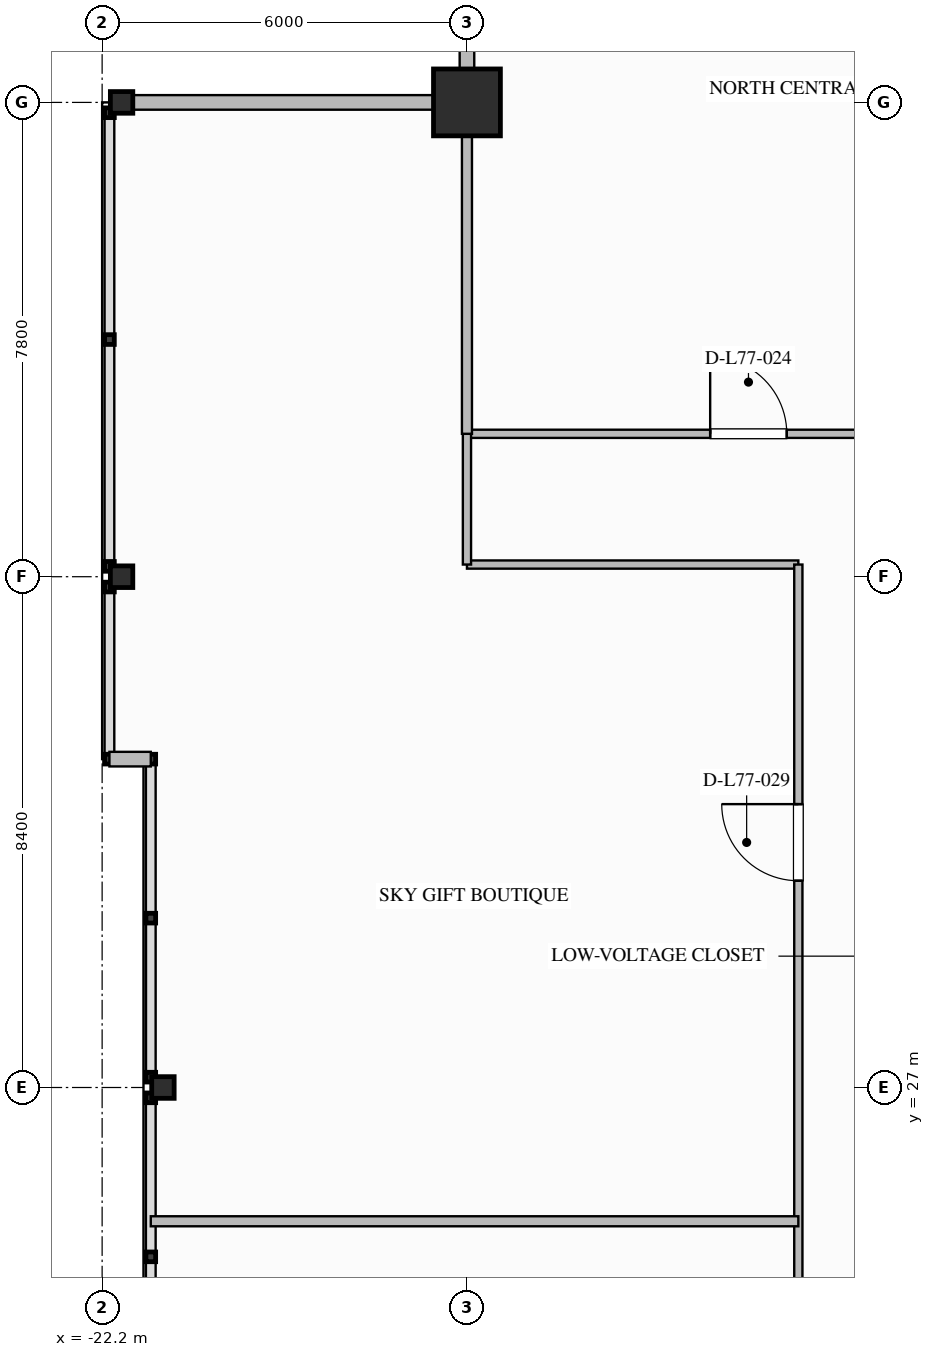
"""IFC4 building model, lengths in metres.
Left out: names, types, materials, properties, quantities, classifications, styles, units other than length and angle.
Written with IfcOpenShell. Run it as: python <this file> out.ifc"""

import sys

from ifc_helpers import new_model, si_unit, direction, frame, frame_2d, origin, origin_2d, place, context, subcontext, project, spatial, rectangle, i_section, extrude, element, fill, save


model = new_model("IFC4")
c1 = context("Model", 3, precision=1e-05, world=origin(), true_north=direction((0.0, 1.0)))
c2 = subcontext(c1, "Body", "Model", "MODEL_VIEW")
j1 = project(units=[si_unit("LENGTHUNIT", "METRE"), si_unit("PLANEANGLEUNIT", "RADIAN")], contexts=[c1])
p1 = place(None, origin())
s1 = spatial("IfcSite", under=j1, at=p1, CompositionType="ELEMENT")
p2 = place(p1, origin())
s2 = spatial("IfcBuilding", under=s1, at=p2, CompositionType="ELEMENT")
p3 = place(p2, frame((0.0, 0.0, 294.2)))
s3 = spatial("IfcBuildingStorey", under=s2, at=p3, CompositionType="ELEMENT", Elevation=294.2)
p4 = place(p3, frame((-16.2, 43.2, 0.0), z_axis=(0.0, 0.0, 1.0), x_axis=(1.0, 0.0, 0.0)))
e1 = element("IfcColumn", 1, at=p4, inside=s3, PredefinedType="COLUMN", context=c2, shape_type="SweptSolid", body=[
    extrude(rectangle(XDim=1.1, YDim=1.1, at=origin_2d()), origin(), (0.0, 0.0, 1.0), 4.4),
])
for number, where, z_axis, x_axis in (
    (2, (-21.2, 27.0, 0.0), (0.0, 0.0, 1.0), (1.0, 0.0, 0.0)),
    (3, (-21.88, 35.4, 0.0), (0.0, 0.0, 1.0), (1.0, 0.0, 0.0)),
    (4, (-21.88, 43.2, 0.0), (0.0, 0.0, 1.0), (1.0, 0.0, 0.0)),
):
    element("IfcColumn", number, at=place(p3, frame(where, z_axis=z_axis, x_axis=x_axis)), inside=s3, PredefinedType="COLUMN", context=c2, shape_type="SweptSolid", body=[
        extrude(i_section(OverallWidth=0.369, OverallDepth=0.356, WebThickness=0.011, FlangeThickness=0.018, FilletRadius=0.025, at=origin_2d()), origin(), (0.0, 0.0, 1.0), 4.397),
    ])
for number, where, z_axis, x_axis in (
    (5, (-22.08, 43.2, 0.0), (0.0, 0.0, 1.0), (1.0, 0.0, 0.0)),
    (6, (-16.2, 43.2, 0.0), (0.0, 0.0, 1.0), (0.0, 1.0, 0.0)),
):
    element("IfcWall", number, at=place(p3, frame(where, z_axis=z_axis, x_axis=x_axis)), inside=s3, PredefinedType="STANDARD", context=c2, shape_type="SweptSolid", body=[
        extrude(rectangle(XDim=5.88, YDim=0.24, at=frame_2d((2.94, 0.0))), origin(), (0.0, 0.0, 1.0), 3.489),
    ])
p5 = place(p3, frame((-21.4, 32.4, 0.0), z_axis=(0.0, 0.0, 1.0), x_axis=(-1.0, 0.0, 0.0)))
e7 = element("IfcWall", 7, at=p5, inside=s3, PredefinedType="STANDARD", context=c2, shape_type="SweptSolid", body=[
    extrude(rectangle(XDim=0.68, YDim=0.24, at=frame_2d((0.34, 0.0))), origin(), (0.0, 0.0, 1.0), 4.1),
])
p6 = place(p3, frame((-16.2, 37.75, 0.0), z_axis=(0.0, 0.0, 1.0), x_axis=(1.0, 0.0, 0.0)))
e8 = element("IfcWall", 8, at=p6, inside=s3, PredefinedType="PARTITIONING", context=c2, shape_type="SweptSolid", body=[
    extrude(rectangle(XDim=32.4, YDim=0.135, at=frame_2d((16.2, 0.0))), origin(), (0.0, 0.0, 1.0), 4.1),
])
p7 = place(p6, frame((4.0, 0.0, 0.0)))
e9 = element("IfcOpeningElement", 9, at=p7, cuts=e8, PredefinedType="OPENING", context=c2, shape_type="SweptSolid", body=[
    extrude(rectangle(XDim=1.26, YDim=2.2, at=frame_2d((0.63, 1.1))), frame((0.0, 0.077, 0.0), z_axis=(0.0, -1.0, 0.0), x_axis=(1.0, 0.0, 0.0)), (0.0, 0.0, 1.0), 0.155),
])
p8 = place(p6, frame((16.3, 0.0, 0.0)))
e10 = element("IfcOpeningElement", 10, at=p8, cuts=e8, PredefinedType="OPENING", context=c2, shape_type="SweptSolid", body=[
    extrude(rectangle(XDim=1.26, YDim=2.2, at=frame_2d((0.63, 1.1))), frame((0.0, 0.077, 0.0), z_axis=(0.0, -1.0, 0.0), x_axis=(1.0, 0.0, 0.0)), (0.0, 0.0, 1.0), 0.155),
])
p9 = place(p6, frame((25.5, 0.0, 0.0)))
e11 = element("IfcOpeningElement", 11, at=p9, cuts=e8, PredefinedType="OPENING", context=c2, shape_type="SweptSolid", body=[
    extrude(rectangle(XDim=0.92, YDim=2.1, at=frame_2d((0.46, 1.05))), frame((0.0, 0.077, 0.0), z_axis=(0.0, -1.0, 0.0), x_axis=(1.0, 0.0, 0.0)), (0.0, 0.0, 1.0), 0.155),
])
p10 = place(p6, frame((29.7, 0.0, 0.0)))
e12 = element("IfcOpeningElement", 12, at=p10, cuts=e8, PredefinedType="OPENING", context=c2, shape_type="SweptSolid", body=[
    extrude(rectangle(XDim=0.98, YDim=2.1, at=frame_2d((0.49, 1.05))), frame((0.0, 0.077, 0.0), z_axis=(0.0, -1.0, 0.0), x_axis=(1.0, 0.0, 0.0)), (0.0, 0.0, 1.0), 0.155),
])
p11 = place(p3, frame((-16.2, 35.6, 0.0), z_axis=(0.0, 0.0, 1.0), x_axis=(1.0, 0.0, 0.0)))
e13 = element("IfcWall", 13, at=p11, inside=s3, PredefinedType="PARTITIONING", context=c2, shape_type="SweptSolid", body=[
    extrude(rectangle(XDim=5.45, YDim=0.135, at=frame_2d((2.725, 0.0))), origin(), (0.0, 0.0, 1.0), 3.478),
])
p12 = place(p3, frame((-10.75, 18.4, 0.0), z_axis=(0.0, 0.0, 1.0), x_axis=(0.0, 1.0, 0.0)))
e14 = element("IfcWall", 14, at=p12, inside=s3, PredefinedType="PARTITIONING", context=c2, shape_type="SweptSolid", body=[
    extrude(rectangle(XDim=17.2, YDim=0.135, at=frame_2d((8.6, 0.0))), origin(), (0.0, 0.0, 1.0), 4.1),
])
p13 = place(p12, frame((2.5, 0.0, 0.0)))
e15 = element("IfcOpeningElement", 15, at=p13, cuts=e14, PredefinedType="OPENING", context=c2, shape_type="SweptSolid", body=[
    extrude(rectangle(XDim=1.26, YDim=2.2, at=frame_2d((0.63, 1.1))), frame((0.0, 0.077, 0.0), z_axis=(0.0, -1.0, 0.0), x_axis=(1.0, 0.0, 0.0)), (0.0, 0.0, 1.0), 0.155),
])
p14 = place(p12, frame((12.0, 0.0, 0.0)))
e16 = element("IfcOpeningElement", 16, at=p14, cuts=e14, PredefinedType="OPENING", context=c2, shape_type="SweptSolid", body=[
    extrude(rectangle(XDim=1.26, YDim=2.2, at=frame_2d((0.63, 1.1))), frame((0.0, 0.077, 0.0), z_axis=(0.0, -1.0, 0.0), x_axis=(1.0, 0.0, 0.0)), (0.0, 0.0, 1.0), 0.155),
])
p15 = place(p3, frame((-16.2, 35.6, 0.0), z_axis=(0.0, 0.0, 1.0), x_axis=(0.0, 1.0, 0.0)))
e17 = element("IfcWall", 17, at=p15, inside=s3, PredefinedType="PARTITIONING", context=c2, shape_type="SweptSolid", body=[
    extrude(rectangle(XDim=2.15, YDim=0.135, at=frame_2d((1.075, 0.0))), origin(), (0.0, 0.0, 1.0), 3.474),
])
p16 = place(p3, frame((-16.2, 37.75, 0.0), z_axis=(0.0, 0.0, 1.0), x_axis=(0.0, 1.0, 0.0)))
e18 = element("IfcWall", 18, at=p16, inside=s3, PredefinedType="PARTITIONING", context=c2, shape_type="SweptSolid", body=[
    extrude(rectangle(XDim=5.33, YDim=0.165, at=frame_2d((2.665, 0.0))), origin(), (0.0, 0.0, 1.0), 3.474),
])
p17 = place(p3, frame((-21.4, 24.8, 0.0), z_axis=(0.0, 0.0, 1.0), x_axis=(1.0, 0.0, 0.0)))
e19 = element("IfcWall", 19, at=p17, inside=s3, PredefinedType="PARTITIONING", context=c2, shape_type="SweptSolid", body=[
    extrude(rectangle(XDim=10.65, YDim=0.165, at=frame_2d((5.325, 0.0))), origin(), (0.0, 0.0, 1.0), 4.1),
])
p18 = place(p7, origin())
e20 = element("IfcDoor", 20, at=p18, inside=s3, OperationType="SINGLE_SWING_LEFT", PredefinedType="DOOR", context=c2, shape_type="SweptSolid", body=[
    extrude(rectangle(XDim=1.26, YDim=2.2, at=frame_2d((0.63, 1.1))), frame((0.0, 0.025, 0.0), z_axis=(0.0, -1.0, 0.0), x_axis=(1.0, 0.0, 0.0)), (0.0, 0.0, 1.0), 0.05),
])
fill(e9, e20)
p19 = place(p14, origin())
e21 = element("IfcDoor", 21, at=p19, inside=s3, OperationType="SINGLE_SWING_RIGHT", PredefinedType="DOOR", context=c2, shape_type="SweptSolid", body=[
    extrude(rectangle(XDim=1.26, YDim=2.2, at=frame_2d((0.63, 1.1))), frame((0.0, 0.025, 0.0), z_axis=(0.0, -1.0, 0.0), x_axis=(1.0, 0.0, 0.0)), (0.0, 0.0, 1.0), 0.05),
])
fill(e16, e21)
save(model, sys.argv[1])
